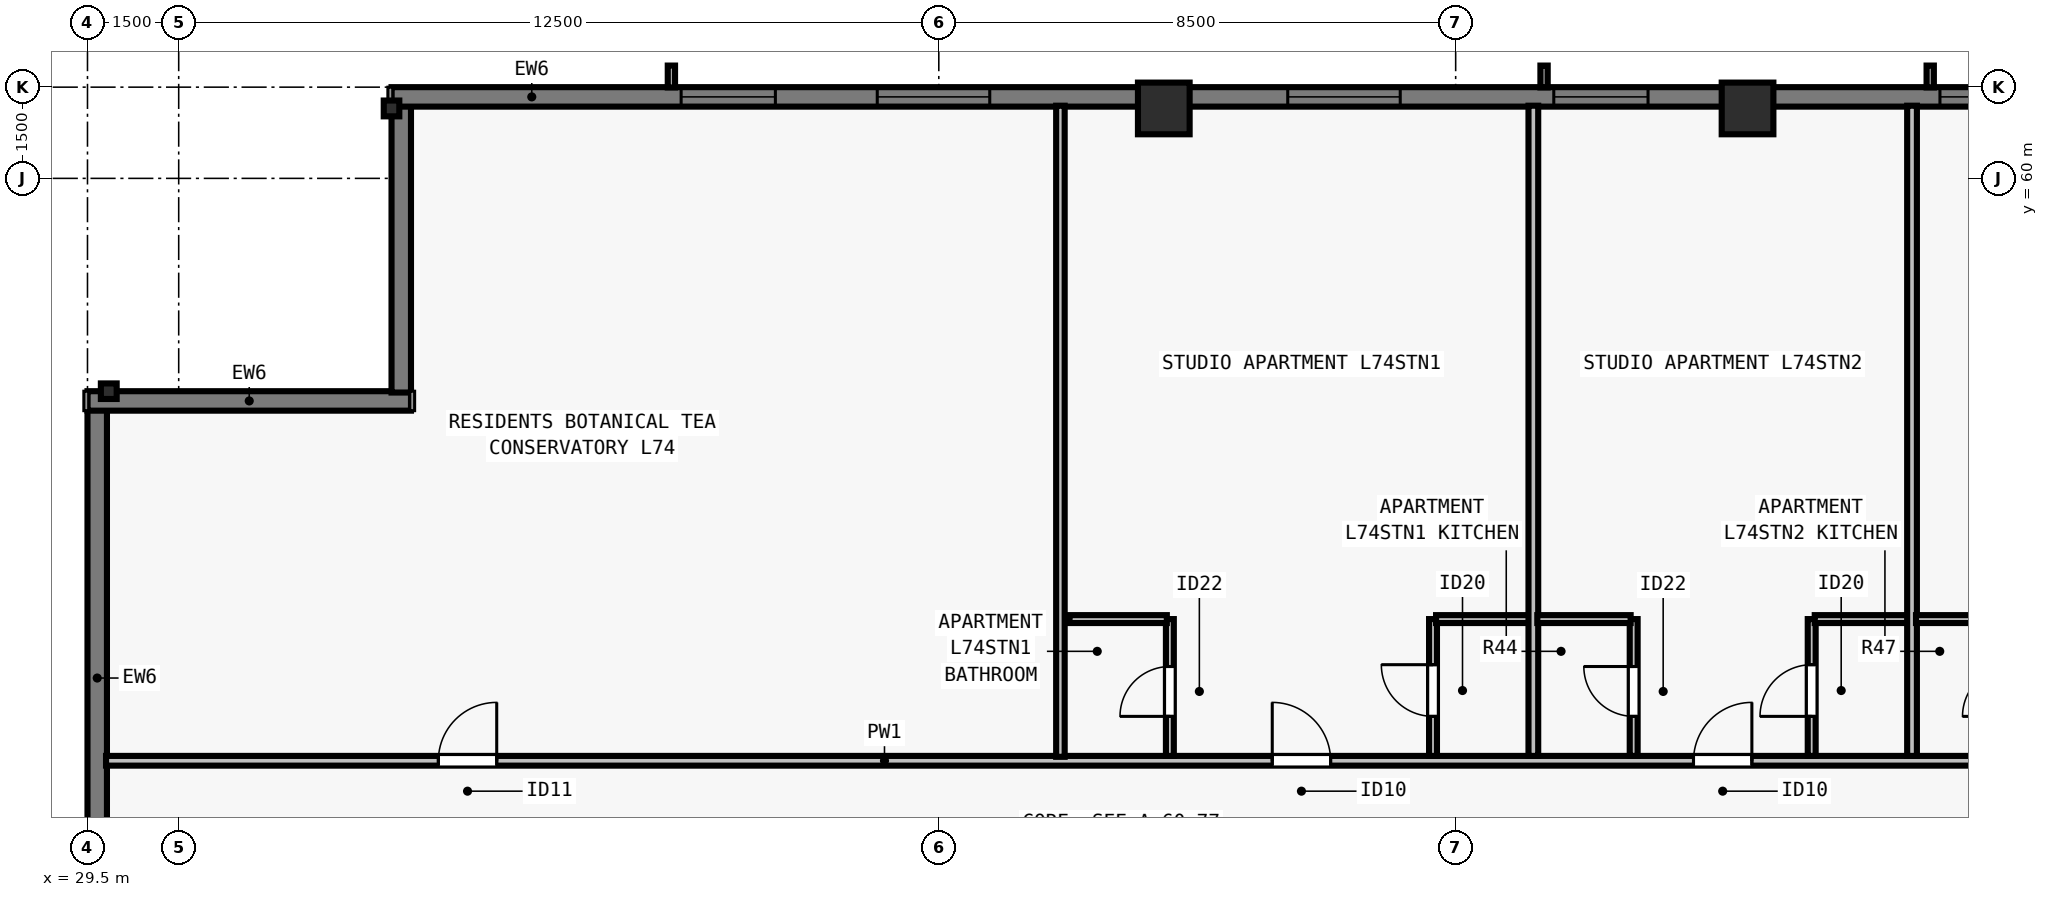
"""IFC4 building model, lengths in metres.
Left out: names, types, materials, properties, quantities, classifications, styles, units other than length and angle.
Written with IfcOpenShell. Run it as: python <this file> out.ifc"""

import sys

from ifc_helpers import new_model, si_unit, direction, frame, frame_2d, origin, origin_2d, place, context, subcontext, project, spatial, rectangle, i_section, extrude, element, fill, save


model = new_model("IFC4")
c1 = context("Model", 3, precision=1e-05, world=origin(), true_north=direction((0.0, 1.0)))
c2 = subcontext(c1, "Body", "Model", "MODEL_VIEW")
j1 = project(units=[si_unit("LENGTHUNIT", "METRE"), si_unit("PLANEANGLEUNIT", "RADIAN")], contexts=[c1])
p1 = place(None, origin())
s1 = spatial("IfcSite", under=j1, at=p1, CompositionType="ELEMENT")
p2 = place(p1, origin())
s2 = spatial("IfcBuilding", under=s1, at=p2, CompositionType="ELEMENT")
p3 = place(p2, frame((0.0, 0.0, 269.0)))
s3 = spatial("IfcBuildingStorey", under=s2, at=p3, CompositionType="ELEMENT", Elevation=269.0)
for number, where, z_axis, x_axis in (
    (1, (56.8, 61.15, 0.0), (0.0, 0.0, 1.0), (1.0, 0.0, 0.0)),
    (2, (47.2, 61.15, 0.0), (0.0, 0.0, 1.0), (1.0, 0.0, 0.0)),
):
    element("IfcColumn", number, at=place(p3, frame(where, z_axis=z_axis, x_axis=x_axis)), inside=s3, PredefinedType="COLUMN", context=c2, shape_type="SweptSolid", body=[
        extrude(rectangle(XDim=0.85, YDim=0.85, at=origin_2d()), origin(), (0.0, 0.0, 1.0), 3.5),
    ])
for number, where, z_axis, x_axis in (
    (3, (34.5, 61.15, 0.0), (0.0, 0.0, 1.0), (1.0, 0.0, 0.0)),
    (4, (29.85, 56.5, 0.0), (0.0, 0.0, 1.0), (0.0, 1.0, 0.0)),
):
    element("IfcColumn", number, at=place(p3, frame(where, z_axis=z_axis, x_axis=x_axis)), inside=s3, PredefinedType="COLUMN", context=c2, shape_type="SweptSolid", body=[
        extrude(i_section(OverallWidth=0.256, OverallDepth=0.26, WebThickness=0.01, FlangeThickness=0.017, FilletRadius=0.013, at=origin_2d()), origin(), (0.0, 0.0, 1.0), 3.5),
    ])
p4 = place(p3, frame((29.66, 21.5, 0.0), z_axis=(0.0, 0.0, 1.0), x_axis=(0.0, 1.0, 0.0)))
e5 = element("IfcWall", 5, at=p4, inside=s3, PredefinedType="SOLIDWALL", context=c2, shape_type="SweptSolid", body=[
    extrude(rectangle(XDim=34.702, YDim=0.32, at=frame_2d((17.351, 0.0))), origin(), (0.0, 0.0, 1.0), 3.29),
])
p5 = place(p4, frame((3.913, 0.0, 0.8)))
e6 = element("IfcOpeningElement", 6, at=p5, cuts=e5, PredefinedType="OPENING", context=c2, shape_type="SweptSolid", body=[
    extrude(rectangle(XDim=1.55, YDim=1.678, at=frame_2d((0.775, 0.839))), frame((0.0, 0.17, 0.0), z_axis=(0.0, -1.0, 0.0), x_axis=(1.0, 0.0, 0.0)), (0.0, 0.0, 1.0), 0.34),
])
p6 = place(p4, frame((6.738, 0.0, 0.8)))
e7 = element("IfcOpeningElement", 7, at=p6, cuts=e5, PredefinedType="OPENING", context=c2, shape_type="SweptSolid", body=[
    extrude(rectangle(XDim=1.85, YDim=1.678, at=frame_2d((0.925, 0.839))), frame((0.0, 0.17, 0.0), z_axis=(0.0, -1.0, 0.0), x_axis=(1.0, 0.0, 0.0)), (0.0, 0.0, 1.0), 0.34),
])
p7 = place(p4, frame((10.263, 0.0, 0.8)))
e8 = element("IfcOpeningElement", 8, at=p7, cuts=e5, PredefinedType="OPENING", context=c2, shape_type="SweptSolid", body=[
    extrude(rectangle(XDim=1.55, YDim=1.678, at=frame_2d((0.775, 0.839))), frame((0.0, 0.17, 0.0), z_axis=(0.0, -1.0, 0.0), x_axis=(1.0, 0.0, 0.0)), (0.0, 0.0, 1.0), 0.34),
])
p8 = place(p4, frame((14.738, 0.0, 0.8)))
e9 = element("IfcOpeningElement", 9, at=p8, cuts=e5, PredefinedType="OPENING", context=c2, shape_type="SweptSolid", body=[
    extrude(rectangle(XDim=1.85, YDim=1.678, at=frame_2d((0.925, 0.839))), frame((0.0, 0.17, 0.0), z_axis=(0.0, -1.0, 0.0), x_axis=(1.0, 0.0, 0.0)), (0.0, 0.0, 1.0), 0.34),
])
p9 = place(p4, frame((18.264, 0.0, 0.8)))
e10 = element("IfcOpeningElement", 10, at=p9, cuts=e5, PredefinedType="OPENING", context=c2, shape_type="SweptSolid", body=[
    extrude(rectangle(XDim=1.55, YDim=1.678, at=frame_2d((0.775, 0.839))), frame((0.0, 0.17, 0.0), z_axis=(0.0, -1.0, 0.0), x_axis=(1.0, 0.0, 0.0)), (0.0, 0.0, 1.0), 0.34),
])
p10 = place(p4, frame((24.164, 0.0, 0.8)))
e11 = element("IfcOpeningElement", 11, at=p10, cuts=e5, PredefinedType="OPENING", context=c2, shape_type="SweptSolid", body=[
    extrude(rectangle(XDim=1.55, YDim=1.678, at=frame_2d((0.775, 0.839))), frame((0.0, 0.17, 0.0), z_axis=(0.0, -1.0, 0.0), x_axis=(1.0, 0.0, 0.0)), (0.0, 0.0, 1.0), 0.34),
])
p11 = place(p3, frame((29.5, 56.34, 0.0), z_axis=(0.0, 0.0, 1.0), x_axis=(1.0, 0.0, 0.0)))
e12 = element("IfcWall", 12, at=p11, inside=s3, PredefinedType="SOLIDWALL", context=c2, shape_type="SweptSolid", body=[
    extrude(rectangle(XDim=5.32, YDim=0.32, at=frame_2d((2.66, 0.0))), origin(), (0.0, 0.0, 1.0), 3.29),
])
p12 = place(p3, frame((34.66, 56.478, 0.0), z_axis=(0.0, 0.0, 1.0), x_axis=(0.0, 1.0, 0.0)))
e13 = element("IfcWall", 13, at=p12, inside=s3, PredefinedType="SOLIDWALL", context=c2, shape_type="SweptSolid", body=[
    extrude(rectangle(XDim=4.724, YDim=0.32, at=frame_2d((2.362, 0.0))), origin(), (0.0, 0.0, 1.0), 3.29),
])
p13 = place(p3, frame((34.5, 61.34, 0.0), z_axis=(0.0, 0.0, 1.0), x_axis=(1.0, 0.0, 0.0)))
e14 = element("IfcWall", 14, at=p13, inside=s3, PredefinedType="SOLIDWALL", context=c2, shape_type="SweptSolid", body=[
    extrude(rectangle(XDim=34.702, YDim=0.32, at=frame_2d((17.351, 0.0))), origin(), (0.0, 0.0, 1.0), 3.29),
])
p14 = place(p13, frame((4.763, 0.0, 0.8)))
e15 = element("IfcOpeningElement", 15, at=p14, cuts=e14, PredefinedType="OPENING", context=c2, shape_type="SweptSolid", body=[
    extrude(rectangle(XDim=1.55, YDim=1.678, at=frame_2d((0.775, 0.839))), frame((0.0, 0.17, 0.0), z_axis=(0.0, -1.0, 0.0), x_axis=(1.0, 0.0, 0.0)), (0.0, 0.0, 1.0), 0.34),
])
p15 = place(p13, frame((7.988, 0.0, 0.8)))
e16 = element("IfcOpeningElement", 16, at=p15, cuts=e14, PredefinedType="OPENING", context=c2, shape_type="SweptSolid", body=[
    extrude(rectangle(XDim=1.85, YDim=1.678, at=frame_2d((0.925, 0.839))), frame((0.0, 0.17, 0.0), z_axis=(0.0, -1.0, 0.0), x_axis=(1.0, 0.0, 0.0)), (0.0, 0.0, 1.0), 0.34),
])
p16 = place(p13, frame((14.738, 0.0, 0.8)))
e17 = element("IfcOpeningElement", 17, at=p16, cuts=e14, PredefinedType="OPENING", context=c2, shape_type="SweptSolid", body=[
    extrude(rectangle(XDim=1.85, YDim=1.678, at=frame_2d((0.925, 0.839))), frame((0.0, 0.17, 0.0), z_axis=(0.0, -1.0, 0.0), x_axis=(1.0, 0.0, 0.0)), (0.0, 0.0, 1.0), 0.34),
])
p17 = place(p13, frame((19.114, 0.0, 0.8)))
e18 = element("IfcOpeningElement", 18, at=p17, cuts=e14, PredefinedType="OPENING", context=c2, shape_type="SweptSolid", body=[
    extrude(rectangle(XDim=1.55, YDim=1.678, at=frame_2d((0.775, 0.839))), frame((0.0, 0.17, 0.0), z_axis=(0.0, -1.0, 0.0), x_axis=(1.0, 0.0, 0.0)), (0.0, 0.0, 1.0), 0.34),
])
p18 = place(p13, frame((25.464, 0.0, 0.8)))
e19 = element("IfcOpeningElement", 19, at=p18, cuts=e14, PredefinedType="OPENING", context=c2, shape_type="SweptSolid", body=[
    extrude(rectangle(XDim=1.55, YDim=1.678, at=frame_2d((0.775, 0.839))), frame((0.0, 0.17, 0.0), z_axis=(0.0, -1.0, 0.0), x_axis=(1.0, 0.0, 0.0)), (0.0, 0.0, 1.0), 0.34),
])
p19 = place(p13, frame((28.24, 0.0, 0.8)))
e20 = element("IfcOpeningElement", 20, at=p19, cuts=e14, PredefinedType="OPENING", context=c2, shape_type="SweptSolid", body=[
    extrude(rectangle(XDim=1.85, YDim=1.678, at=frame_2d((0.925, 0.839))), frame((0.0, 0.17, 0.0), z_axis=(0.0, -1.0, 0.0), x_axis=(1.0, 0.0, 0.0)), (0.0, 0.0, 1.0), 0.34),
])
p20 = place(p3, frame((29.805, 50.423, 0.0), z_axis=(0.0, 0.0, 1.0), x_axis=(1.0, 0.0, 0.0)))
e21 = element("IfcWall", 21, at=p20, inside=s3, PredefinedType="PARTITIONING", context=c2, shape_type="SweptSolid", body=[
    extrude(rectangle(XDim=44.39, YDim=0.16, at=frame_2d((22.195, 0.0))), origin(), (0.0, 0.0, 1.0), 2.958),
])
p21 = place(p20, frame((5.465, 0.0, 0.0)))
e22 = element("IfcOpeningElement", 22, at=p21, cuts=e21, PredefinedType="OPENING", context=c2, shape_type="SweptSolid", body=[
    extrude(rectangle(XDim=0.96, YDim=2.12, at=frame_2d((0.48, 1.06))), frame((0.0, 0.09, 0.0), z_axis=(0.0, -1.0, 0.0), x_axis=(1.0, 0.0, 0.0)), (0.0, 0.0, 1.0), 0.18),
])
p22 = place(p20, frame((19.179, 0.0, 0.0)))
e23 = element("IfcOpeningElement", 23, at=p22, cuts=e21, PredefinedType="OPENING", context=c2, shape_type="SweptSolid", body=[
    extrude(rectangle(XDim=0.96, YDim=2.18, at=frame_2d((0.48, 1.09))), frame((0.0, 0.09, 0.0), z_axis=(0.0, -1.0, 0.0), x_axis=(1.0, 0.0, 0.0)), (0.0, 0.0, 1.0), 0.18),
])
p23 = place(p20, frame((26.106, 0.0, 0.0)))
e24 = element("IfcOpeningElement", 24, at=p23, cuts=e21, PredefinedType="OPENING", context=c2, shape_type="SweptSolid", body=[
    extrude(rectangle(XDim=0.96, YDim=2.18, at=frame_2d((0.48, 1.09))), frame((0.0, 0.09, 0.0), z_axis=(0.0, -1.0, 0.0), x_axis=(1.0, 0.0, 0.0)), (0.0, 0.0, 1.0), 0.18),
])
p24 = place(p20, frame((33.214, 0.0, 0.0)))
e25 = element("IfcOpeningElement", 25, at=p24, cuts=e21, PredefinedType="OPENING", context=c2, shape_type="SweptSolid", body=[
    extrude(rectangle(XDim=0.96, YDim=2.18, at=frame_2d((0.48, 1.09))), frame((0.0, 0.09, 0.0), z_axis=(0.0, -1.0, 0.0), x_axis=(1.0, 0.0, 0.0)), (0.0, 0.0, 1.0), 0.18),
])
p25 = place(p20, frame((40.501, 0.0, 0.0)))
e26 = element("IfcOpeningElement", 26, at=p25, cuts=e21, PredefinedType="OPENING", context=c2, shape_type="SweptSolid", body=[
    extrude(rectangle(XDim=0.96, YDim=2.18, at=frame_2d((0.48, 1.09))), frame((0.0, 0.09, 0.0), z_axis=(0.0, -1.0, 0.0), x_axis=(1.0, 0.0, 0.0)), (0.0, 0.0, 1.0), 0.18),
])
p26 = place(p3, frame((45.5, 50.488, 0.0), z_axis=(0.0, 0.0, 1.0), x_axis=(0.0, 1.0, 0.0)))
e27 = element("IfcWall", 27, at=p26, inside=s3, PredefinedType="PARTITIONING", context=c2, shape_type="SweptSolid", body=[
    extrude(rectangle(XDim=10.708, YDim=0.14, at=frame_2d((5.354, 0.0))), origin(), (0.0, 0.0, 1.0), 3.29),
])
p27 = place(p3, frame((47.3, 50.502, 0.0), z_axis=(0.0, 0.0, 1.0), x_axis=(0.0, 1.0, 0.0)))
e28 = element("IfcWall", 28, at=p27, inside=s3, PredefinedType="PLUMBINGWALL", context=c2, shape_type="SweptSolid", body=[
    extrude(rectangle(XDim=2.25, YDim=0.13, at=frame_2d((1.125, 0.0))), origin(), (0.0, 0.0, 1.0), 2.573),
])
p28 = place(p27, frame((0.65, 0.0, 0.0)))
e29 = element("IfcOpeningElement", 29, at=p28, cuts=e28, PredefinedType="OPENING", context=c2, shape_type="SweptSolid", body=[
    extrude(rectangle(XDim=0.82, YDim=2.1, at=frame_2d((0.41, 1.05))), frame((0.0, 0.075, 0.0), z_axis=(0.0, -1.0, 0.0), x_axis=(1.0, 0.0, 0.0)), (0.0, 0.0, 1.0), 0.15),
])
p29 = place(p3, frame((45.65, 52.752, 0.0), z_axis=(0.0, 0.0, 1.0), x_axis=(1.0, 0.0, 0.0)))
e30 = element("IfcWall", 30, at=p29, inside=s3, PredefinedType="PLUMBINGWALL", context=c2, shape_type="SweptSolid", body=[
    extrude(rectangle(XDim=1.6, YDim=0.13, at=frame_2d((0.8, 0.0))), origin(), (0.0, 0.0, 1.0), 3.29),
])
p30 = place(p3, frame((51.627, 50.502, 0.0), z_axis=(0.0, 0.0, 1.0), x_axis=(0.0, 1.0, 0.0)))
e31 = element("IfcWall", 31, at=p30, inside=s3, PredefinedType="PLUMBINGWALL", context=c2, shape_type="SweptSolid", body=[
    extrude(rectangle(XDim=2.25, YDim=0.13, at=frame_2d((1.125, 0.0))), origin(), (0.0, 0.0, 1.0), 3.29),
])
p31 = place(p30, frame((0.65, 0.0, 0.0)))
e32 = element("IfcOpeningElement", 32, at=p31, cuts=e31, PredefinedType="OPENING", context=c2, shape_type="SweptSolid", body=[
    extrude(rectangle(XDim=0.85, YDim=2.1, at=frame_2d((0.425, 1.05))), frame((0.0, 0.075, 0.0), z_axis=(0.0, -1.0, 0.0), x_axis=(1.0, 0.0, 0.0)), (0.0, 0.0, 1.0), 0.15),
])
p32 = place(p3, frame((51.677, 52.752, 0.0), z_axis=(0.0, 0.0, 1.0), x_axis=(1.0, 0.0, 0.0)))
e33 = element("IfcWall", 33, at=p32, inside=s3, PredefinedType="PLUMBINGWALL", context=c2, shape_type="SweptSolid", body=[
    extrude(rectangle(XDim=1.6, YDim=0.13, at=frame_2d((0.8, 0.0))), origin(), (0.0, 0.0, 1.0), 3.29),
])
p33 = place(p3, frame((53.278, 50.502, 0.0), z_axis=(0.0, 0.0, 1.0), x_axis=(0.0, 1.0, 0.0)))
e34 = element("IfcWall", 34, at=p33, inside=s3, PredefinedType="PARTITIONING", context=c2, shape_type="SweptSolid", body=[
    extrude(rectangle(XDim=10.693, YDim=0.16, at=frame_2d((5.346, 0.0))), origin(), (0.0, 0.0, 1.0), 2.958),
])
p34 = place(p3, frame((54.927, 50.502, 0.0), z_axis=(0.0, 0.0, 1.0), x_axis=(0.0, 1.0, 0.0)))
e35 = element("IfcWall", 35, at=p34, inside=s3, PredefinedType="PLUMBINGWALL", context=c2, shape_type="SweptSolid", body=[
    extrude(rectangle(XDim=2.25, YDim=0.13, at=frame_2d((1.125, 0.0))), origin(), (0.0, 0.0, 1.0), 3.29),
])
p35 = place(p34, frame((0.65, 0.0, 0.0)))
e36 = element("IfcOpeningElement", 36, at=p35, cuts=e35, PredefinedType="OPENING", context=c2, shape_type="SweptSolid", body=[
    extrude(rectangle(XDim=0.82, YDim=2.1, at=frame_2d((0.41, 1.05))), frame((0.0, 0.075, 0.0), z_axis=(0.0, -1.0, 0.0), x_axis=(1.0, 0.0, 0.0)), (0.0, 0.0, 1.0), 0.15),
])
p36 = place(p3, frame((53.343, 52.752, 0.0), z_axis=(0.0, 0.0, 1.0), x_axis=(1.0, 0.0, 0.0)))
e37 = element("IfcWall", 37, at=p36, inside=s3, PredefinedType="PLUMBINGWALL", context=c2, shape_type="SweptSolid", body=[
    extrude(rectangle(XDim=1.535, YDim=0.13, at=frame_2d((0.768, 0.0))), origin(), (0.0, 0.0, 1.0), 3.29),
])
p37 = place(p3, frame((57.855, 50.502, 0.0), z_axis=(0.0, 0.0, 1.0), x_axis=(0.0, 1.0, 0.0)))
e38 = element("IfcWall", 38, at=p37, inside=s3, PredefinedType="PLUMBINGWALL", context=c2, shape_type="SweptSolid", body=[
    extrude(rectangle(XDim=2.25, YDim=0.13, at=frame_2d((1.125, 0.0))), origin(), (0.0, 0.0, 1.0), 3.29),
])
p38 = place(p37, frame((0.65, 0.0, 0.0)))
e39 = element("IfcOpeningElement", 39, at=p38, cuts=e38, PredefinedType="OPENING", context=c2, shape_type="SweptSolid", body=[
    extrude(rectangle(XDim=0.85, YDim=2.1, at=frame_2d((0.425, 1.05))), frame((0.0, 0.075, 0.0), z_axis=(0.0, -1.0, 0.0), x_axis=(1.0, 0.0, 0.0)), (0.0, 0.0, 1.0), 0.15),
])
p39 = place(p3, frame((57.905, 52.752, 0.0), z_axis=(0.0, 0.0, 1.0), x_axis=(1.0, 0.0, 0.0)))
e40 = element("IfcWall", 40, at=p39, inside=s3, PredefinedType="PLUMBINGWALL", context=c2, shape_type="SweptSolid", body=[
    extrude(rectangle(XDim=1.6, YDim=0.13, at=frame_2d((0.8, 0.0))), origin(), (0.0, 0.0, 1.0), 3.29),
])
p40 = place(p3, frame((59.505, 50.502, 0.0), z_axis=(0.0, 0.0, 1.0), x_axis=(0.0, 1.0, 0.0)))
e41 = element("IfcWall", 41, at=p40, inside=s3, PredefinedType="PARTITIONING", context=c2, shape_type="SweptSolid", body=[
    extrude(rectangle(XDim=10.693, YDim=0.16, at=frame_2d((5.346, 0.0))), origin(), (0.0, 0.0, 1.0), 3.29),
])
p41 = place(p3, frame((59.57, 52.752, 0.0), z_axis=(0.0, 0.0, 1.0), x_axis=(1.0, 0.0, 0.0)))
e42 = element("IfcWall", 42, at=p41, inside=s3, PredefinedType="PLUMBINGWALL", context=c2, shape_type="SweptSolid", body=[
    extrude(rectangle(XDim=1.535, YDim=0.13, at=frame_2d((0.768, 0.0))), origin(), (0.0, 0.0, 1.0), 3.29),
])
p42 = place(p14, origin())
e43 = element("IfcWindow", 43, at=p42, inside=s3, PartitioningType="SINGLE_PANEL", PredefinedType="WINDOW", context=c2, shape_type="SweptSolid", body=[
    extrude(rectangle(XDim=1.55, YDim=1.678, at=frame_2d((0.775, 0.839))), frame((0.0, -0.05, 0.0), z_axis=(0.0, -1.0, 0.0), x_axis=(1.0, 0.0, 0.0)), (0.0, 0.0, 1.0), 0.06),
])
fill(e15, e43)
p43 = place(p15, origin())
e44 = element("IfcWindow", 44, at=p43, inside=s3, PartitioningType="SINGLE_PANEL", PredefinedType="WINDOW", context=c2, shape_type="SweptSolid", body=[
    extrude(rectangle(XDim=1.85, YDim=1.678, at=frame_2d((0.925, 0.839))), frame((0.0, -0.05, 0.0), z_axis=(0.0, -1.0, 0.0), x_axis=(1.0, 0.0, 0.0)), (0.0, 0.0, 1.0), 0.06),
])
fill(e16, e44)
p44 = place(p16, origin())
e45 = element("IfcWindow", 45, at=p44, inside=s3, PartitioningType="SINGLE_PANEL", PredefinedType="WINDOW", context=c2, shape_type="SweptSolid", body=[
    extrude(rectangle(XDim=1.85, YDim=1.678, at=frame_2d((0.925, 0.839))), frame((0.0, -0.05, 0.0), z_axis=(0.0, -1.0, 0.0), x_axis=(1.0, 0.0, 0.0)), (0.0, 0.0, 1.0), 0.06),
])
fill(e17, e45)
p45 = place(p17, origin())
e46 = element("IfcWindow", 46, at=p45, inside=s3, PartitioningType="SINGLE_PANEL", PredefinedType="WINDOW", context=c2, shape_type="SweptSolid", body=[
    extrude(rectangle(XDim=1.55, YDim=1.678, at=frame_2d((0.775, 0.839))), frame((0.0, -0.05, 0.0), z_axis=(0.0, -1.0, 0.0), x_axis=(1.0, 0.0, 0.0)), (0.0, 0.0, 1.0), 0.06),
])
fill(e18, e46)
p46 = place(p18, origin())
e47 = element("IfcWindow", 47, at=p46, inside=s3, PartitioningType="SINGLE_PANEL", PredefinedType="WINDOW", context=c2, shape_type="SweptSolid", body=[
    extrude(rectangle(XDim=1.55, YDim=1.678, at=frame_2d((0.775, 0.839))), frame((0.0, -0.05, 0.0), z_axis=(0.0, -1.0, 0.0), x_axis=(1.0, 0.0, 0.0)), (0.0, 0.0, 1.0), 0.06),
])
fill(e19, e47)
p47 = place(p21, origin())
e48 = element("IfcDoor", 48, at=p47, inside=s3, OperationType="SINGLE_SWING_RIGHT", PredefinedType="DOOR", context=c2, shape_type="SweptSolid", body=[
    extrude(rectangle(XDim=0.96, YDim=2.12, at=frame_2d((0.48, 1.06))), frame((0.0, 0.025, 0.0), z_axis=(0.0, -1.0, 0.0), x_axis=(1.0, 0.0, 0.0)), (0.0, 0.0, 1.0), 0.05),
])
fill(e22, e48)
p48 = place(p28, origin())
e49 = element("IfcDoor", 49, at=p48, inside=s3, OperationType="SINGLE_SWING_LEFT", PredefinedType="DOOR", context=c2, shape_type="SweptSolid", body=[
    extrude(rectangle(XDim=0.82, YDim=2.1, at=frame_2d((0.41, 1.05))), frame((0.0, 0.025, 0.0), z_axis=(0.0, -1.0, 0.0), x_axis=(1.0, 0.0, 0.0)), (0.0, 0.0, 1.0), 0.05),
])
fill(e29, e49)
p49 = place(p31, origin())
e50 = element("IfcDoor", 50, at=p49, inside=s3, OperationType="SINGLE_SWING_RIGHT", PredefinedType="DOOR", context=c2, shape_type="SweptSolid", body=[
    extrude(rectangle(XDim=0.85, YDim=2.1, at=frame_2d((0.425, 1.05))), frame((0.0, 0.025, 0.0), z_axis=(0.0, -1.0, 0.0), x_axis=(1.0, 0.0, 0.0)), (0.0, 0.0, 1.0), 0.05),
])
fill(e32, e50)
p50 = place(p22, origin())
e51 = element("IfcDoor", 51, at=p50, inside=s3, OperationType="SINGLE_SWING_LEFT", PredefinedType="DOOR", context=c2, shape_type="SweptSolid", body=[
    extrude(rectangle(XDim=0.96, YDim=2.18, at=frame_2d((0.48, 1.09))), frame((0.0, 0.025, 0.0), z_axis=(0.0, -1.0, 0.0), x_axis=(1.0, 0.0, 0.0)), (0.0, 0.0, 1.0), 0.05),
])
fill(e23, e51)
p51 = place(p35, origin())
e52 = element("IfcDoor", 52, at=p51, inside=s3, OperationType="SINGLE_SWING_RIGHT", PredefinedType="DOOR", context=c2, shape_type="SweptSolid", body=[
    extrude(rectangle(XDim=0.82, YDim=2.1, at=frame_2d((0.41, 1.05))), frame((0.0, 0.025, 0.0), z_axis=(0.0, -1.0, 0.0), x_axis=(1.0, 0.0, 0.0)), (0.0, 0.0, 1.0), 0.05),
])
fill(e36, e52)
p52 = place(p38, origin())
e53 = element("IfcDoor", 53, at=p52, inside=s3, OperationType="SINGLE_SWING_LEFT", PredefinedType="DOOR", context=c2, shape_type="SweptSolid", body=[
    extrude(rectangle(XDim=0.85, YDim=2.1, at=frame_2d((0.425, 1.05))), frame((0.0, 0.025, 0.0), z_axis=(0.0, -1.0, 0.0), x_axis=(1.0, 0.0, 0.0)), (0.0, 0.0, 1.0), 0.05),
])
fill(e39, e53)
p53 = place(p23, origin())
e54 = element("IfcDoor", 54, at=p53, inside=s3, OperationType="SINGLE_SWING_RIGHT", PredefinedType="DOOR", context=c2, shape_type="SweptSolid", body=[
    extrude(rectangle(XDim=0.96, YDim=2.18, at=frame_2d((0.48, 1.09))), frame((0.0, 0.025, 0.0), z_axis=(0.0, -1.0, 0.0), x_axis=(1.0, 0.0, 0.0)), (0.0, 0.0, 1.0), 0.05),
])
fill(e24, e54)
save(model, sys.argv[1])
